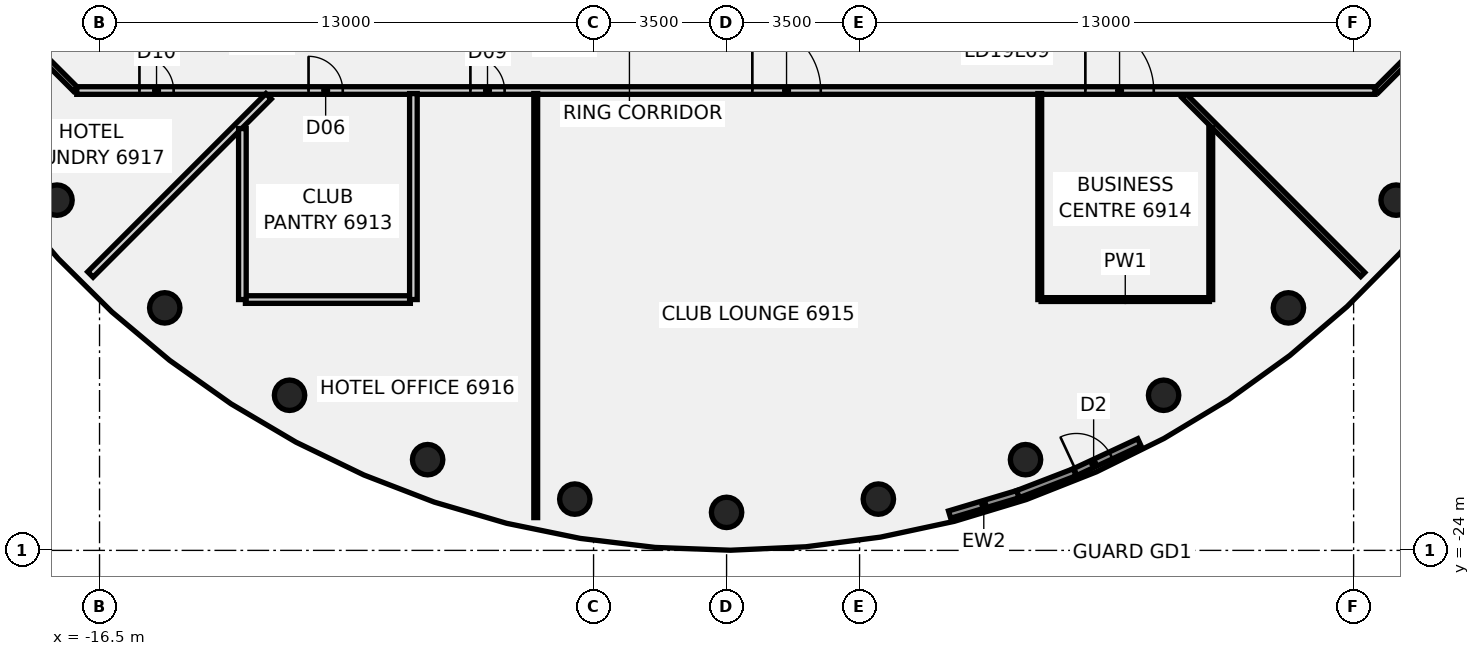
"""IFC4 building model, lengths in metres.
Left out: names, types, materials, properties, quantities, classifications, styles, units other than length and angle.
Written with IfcOpenShell. Run it as: python <this file> out.ifc"""

import sys

from ifc_helpers import new_model, si_unit, direction, frame, frame_2d, origin, origin_2d, place, context, subcontext, project, spatial, rectangle, circle, extrude, element, fill, save


model = new_model("IFC4")
c1 = context("Model", 3, precision=1e-05, world=origin(), true_north=direction((0.0, 1.0)))
c2 = subcontext(c1, "Body", "Model", "MODEL_VIEW")
j1 = project(units=[si_unit("LENGTHUNIT", "METRE"), si_unit("PLANEANGLEUNIT", "RADIAN")], contexts=[c1])
p1 = place(None, origin())
s1 = spatial("IfcSite", under=j1, at=p1, CompositionType="ELEMENT")
p2 = place(p1, origin())
s2 = spatial("IfcBuilding", under=s1, at=p2, CompositionType="ELEMENT")
p3 = place(p2, frame((0.0, 0.0, 271.2)))
s3 = spatial("IfcBuildingStorey", under=s2, at=p3, CompositionType="ELEMENT", Elevation=271.2)
for number, where, z_axis, x_axis in (
    (1, (-17.619, -14.784, -0.14), (0.0, 0.0, 1.0), (1.0, 0.0, 0.0)),
    (2, (-14.784, -17.619, -0.14), (0.0, 0.0, 1.0), (1.0, 0.0, 0.0)),
    (3, (-11.5, -19.919, -0.14), (0.0, 0.0, 1.0), (1.0, 0.0, 0.0)),
    (4, (-7.866, -21.613, -0.14), (0.0, 0.0, 1.0), (1.0, 0.0, 0.0)),
    (5, (-3.994, -22.651, -0.14), (0.0, 0.0, 1.0), (1.0, 0.0, 0.0)),
    (6, (0.0, -23.0, -0.14), (0.0, 0.0, 1.0), (1.0, 0.0, 0.0)),
    (7, (3.994, -22.651, -0.14), (0.0, 0.0, 1.0), (1.0, 0.0, 0.0)),
    (8, (7.866, -21.613, -0.14), (0.0, 0.0, 1.0), (1.0, 0.0, 0.0)),
    (9, (11.5, -19.919, -0.14), (0.0, 0.0, 1.0), (1.0, 0.0, 0.0)),
    (10, (14.784, -17.619, -0.14), (0.0, 0.0, 1.0), (1.0, 0.0, 0.0)),
    (11, (17.619, -14.784, -0.14), (0.0, 0.0, 1.0), (1.0, 0.0, 0.0)),
):
    element("IfcColumn", number, at=place(p3, frame(where, z_axis=z_axis, x_axis=x_axis)), inside=s3, PredefinedType="COLUMN", context=c2, shape_type="SweptSolid", body=[
        extrude(circle(Radius=0.4, at=origin_2d()), origin(), (0.0, 0.0, 1.0), 3.6),
    ])
p4 = place(p3, frame((-18.872, -10.128, 0.0), z_axis=(0.0, 0.0, 1.0), x_axis=(0.707106781187, -0.707106781187, 0.0)))
e12 = element("IfcWall", 12, at=p4, inside=s3, PredefinedType="PARTITIONING", context=c2, shape_type="SweptSolid", body=[
    extrude(rectangle(XDim=2.455, YDim=0.15, at=frame_2d((1.228, 0.0))), origin(), (0.0, 0.0, 1.0), 2.864),
])
p5 = place(p3, frame((12.034, -12.034, 0.0), z_axis=(0.0, 0.0, 1.0), x_axis=(0.707106781187, -0.707106781187, 0.0)))
e13 = element("IfcWall", 13, at=p5, inside=s3, PredefinedType="PARTITIONING", context=c2, shape_type="SweptSolid", body=[
    extrude(rectangle(XDim=6.655, YDim=0.15, at=frame_2d((3.328, 0.0))), origin(), (0.0, 0.0, 1.0), 2.864),
])
p6 = place(p3, frame((-17.1, -11.9, 0.0), z_axis=(0.0, 0.0, 1.0), x_axis=(1.0, 0.0, 0.0)))
e14 = element("IfcWall", 14, at=p6, inside=s3, PredefinedType="PARTITIONING", context=c2, shape_type="SweptSolid", body=[
    extrude(rectangle(XDim=34.165, YDim=0.2, at=frame_2d((17.083, 0.0))), origin(), (0.0, 0.0, 1.0), 2.864),
])
p7 = place(p6, frame((6.1, 0.0, 0.0)))
e15 = element("IfcOpeningElement", 15, at=p7, cuts=e14, PredefinedType="OPENING", context=c2, shape_type="SweptSolid", body=[
    extrude(rectangle(XDim=0.9, YDim=2.1, at=frame_2d((0.45, 1.05))), frame((0.0, 0.11, 0.0), z_axis=(0.0, -1.0, 0.0), x_axis=(1.0, 0.0, 0.0)), (0.0, 0.0, 1.0), 0.22),
])
p8 = place(p6, frame((26.541, 0.0, 0.0)))
e16 = element("IfcOpeningElement", 16, at=p8, cuts=e14, PredefinedType="OPENING", context=c2, shape_type="SweptSolid", body=[
    extrude(rectangle(XDim=1.8, YDim=2.1, at=frame_2d((0.9, 1.05))), frame((0.0, 0.11, 0.0), z_axis=(0.0, -1.0, 0.0), x_axis=(1.0, 0.0, 0.0)), (0.0, 0.0, 1.0), 0.22),
])
p9 = place(p6, frame((17.778, 0.0, 0.0)))
e17 = element("IfcOpeningElement", 17, at=p9, cuts=e14, PredefinedType="OPENING", context=c2, shape_type="SweptSolid", body=[
    extrude(rectangle(XDim=1.8, YDim=2.1, at=frame_2d((0.9, 1.05))), frame((0.0, 0.11, 0.0), z_axis=(0.0, -1.0, 0.0), x_axis=(1.0, 0.0, 0.0)), (0.0, 0.0, 1.0), 0.22),
])
p10 = place(p6, frame((10.359, 0.0, 0.0)))
e18 = element("IfcOpeningElement", 18, at=p10, cuts=e14, PredefinedType="OPENING", context=c2, shape_type="SweptSolid", body=[
    extrude(rectangle(XDim=0.9, YDim=2.1, at=frame_2d((0.45, 1.05))), frame((0.0, 0.11, 0.0), z_axis=(0.0, -1.0, 0.0), x_axis=(1.0, 0.0, 0.0)), (0.0, 0.0, 1.0), 0.22),
])
p11 = place(p6, frame((1.65, 0.0, 0.0)))
e19 = element("IfcOpeningElement", 19, at=p11, cuts=e14, PredefinedType="OPENING", context=c2, shape_type="SweptSolid", body=[
    extrude(rectangle(XDim=0.9, YDim=2.1, at=frame_2d((0.45, 1.05))), frame((0.0, 0.11, 0.0), z_axis=(0.0, -1.0, 0.0), x_axis=(1.0, 0.0, 0.0)), (0.0, 0.0, 1.0), 0.22),
])
p12 = place(p3, frame((-12.661, -17.4, 0.0), z_axis=(0.0, 0.0, 1.0), x_axis=(1.0, 0.0, 0.0)))
e20 = element("IfcWall", 20, at=p12, inside=s3, PredefinedType="PARTITIONING", context=c2, shape_type="SweptSolid", body=[
    extrude(rectangle(XDim=4.34, YDim=0.2, at=frame_2d((2.17, 0.0))), origin(), (0.0, 0.0, 1.0), 2.864),
])
p13 = place(p3, frame((8.276, -17.4, 0.0), z_axis=(0.0, 0.0, 1.0), x_axis=(1.0, 0.0, 0.0)))
e21 = element("IfcWall", 21, at=p13, inside=s3, PredefinedType="PARTITIONING", context=c2, shape_type="SweptSolid", body=[
    extrude(rectangle(XDim=4.43, YDim=0.1, at=frame_2d((2.215, 0.0))), origin(), (0.0, 0.0, 1.0), 2.864),
])
p14 = place(p3, frame((-16.74, -16.74, 0.0), z_axis=(0.0, 0.0, 1.0), x_axis=(0.707106781187, 0.707106781187, 0.0)))
e22 = element("IfcWall", 22, at=p14, inside=s3, PredefinedType="PARTITIONING", context=c2, shape_type="SweptSolid", body=[
    extrude(rectangle(XDim=6.631, YDim=0.2, at=frame_2d((3.315, 0.0))), origin(), (0.0, 0.0, 1.0), 2.864),
])
p15 = place(p3, frame((17.1, -11.9, 0.0), z_axis=(0.0, 0.0, 1.0), x_axis=(0.707106781187, 0.707106781187, 0.0)))
e23 = element("IfcWall", 23, at=p15, inside=s3, PredefinedType="PARTITIONING", context=c2, shape_type="SweptSolid", body=[
    extrude(rectangle(XDim=2.505, YDim=0.15, at=frame_2d((1.253, 0.0))), origin(), (0.0, 0.0, 1.0), 2.864),
])
p16 = place(p3, frame((-12.741, -17.4, 0.0), z_axis=(0.0, 0.0, 1.0), x_axis=(0.0, 1.0, 0.0)))
e24 = element("IfcWall", 24, at=p16, inside=s3, PredefinedType="PARTITIONING", context=c2, shape_type="SweptSolid", body=[
    extrude(rectangle(XDim=4.499, YDim=0.2, at=frame_2d((2.25, 0.0))), origin(), (0.0, 0.0, 1.0), 2.864),
])
p17 = place(p3, frame((-8.241, -17.4, 0.0), z_axis=(0.0, 0.0, 1.0), x_axis=(0.0, 1.0, 0.0)))
e25 = element("IfcWall", 25, at=p17, inside=s3, PredefinedType="PARTITIONING", context=c2, shape_type="SweptSolid", body=[
    extrude(rectangle(XDim=5.42, YDim=0.2, at=frame_2d((2.71, 0.0))), origin(), (0.0, 0.0, 1.0), 2.864),
])
p18 = place(p3, frame((-5.022, -23.137, 0.0), z_axis=(0.0, 0.0, 1.0), x_axis=(0.0, 1.0, 0.0)))
e26 = element("IfcWall", 26, at=p18, inside=s3, PredefinedType="PARTITIONING", context=c2, shape_type="SweptSolid", body=[
    extrude(rectangle(XDim=11.157, YDim=0.1, at=frame_2d((5.579, 0.0))), origin(), (0.0, 0.0, 1.0), 2.864),
])
p19 = place(p3, frame((8.241, -17.4, 0.0), z_axis=(0.0, 0.0, 1.0), x_axis=(0.0, 1.0, 0.0)))
e27 = element("IfcWall", 27, at=p19, inside=s3, PredefinedType="PARTITIONING", context=c2, shape_type="SweptSolid", body=[
    extrude(rectangle(XDim=5.42, YDim=0.1, at=frame_2d((2.71, 0.0))), origin(), (0.0, 0.0, 1.0), 2.864),
])
p20 = place(p3, frame((12.741, -17.4, 0.0), z_axis=(0.0, 0.0, 1.0), x_axis=(0.0, 1.0, 0.0)))
e28 = element("IfcWall", 28, at=p20, inside=s3, PredefinedType="PARTITIONING", context=c2, shape_type="SweptSolid", body=[
    extrude(rectangle(XDim=4.519, YDim=0.1, at=frame_2d((2.259, 0.0))), origin(), (0.0, 0.0, 1.0), 2.864),
])
p21 = place(p3, frame((5.869, -23.058, 0.0), z_axis=(0.0, 0.0, 1.0), x_axis=(0.958137061689, 0.28630992127, 0.0)))
e29 = element("IfcWall", 29, at=p21, inside=s3, PredefinedType="SOLIDWALL", context=c2, shape_type="SweptSolid", body=[
    extrude(rectangle(XDim=1.878, YDim=0.2, at=frame_2d((0.939, 0.0))), origin(), (0.0, 0.0, 1.0), 3.46),
])
p22 = place(p3, frame((9.16, -21.945, 0.0), z_axis=(0.0, 0.0, 1.0), x_axis=(0.906591500503, 0.422009302286, 0.0)))
e30 = element("IfcWall", 30, at=p22, inside=s3, PredefinedType="SOLIDWALL", context=c2, shape_type="SweptSolid", body=[
    extrude(rectangle(XDim=1.877, YDim=0.2, at=frame_2d((0.938, 0.0))), origin(), (0.0, 0.0, 1.0), 3.46),
])
p23 = place(p22, frame((0.05, 0.0, 0.0)))
e31 = element("IfcOpeningElement", 31, at=p23, cuts=e30, PredefinedType="OPENING", context=c2, shape_type="SweptSolid", body=[
    extrude(rectangle(XDim=1.0, YDim=2.4, at=frame_2d((0.5, 1.2))), frame((0.0, 0.11, 0.0), z_axis=(0.0, -1.0, 0.0), x_axis=(1.0, 0.0, 0.0)), (0.0, 0.0, 1.0), 0.22),
])
p24 = place(p3, frame((7.668, -22.52, 0.0), z_axis=(0.0, 0.0, 1.0), x_axis=(0.933046310402, 0.359756282287, 0.0)))
e32 = element("IfcWall", 32, at=p24, inside=s3, PredefinedType="SOLIDWALL", context=c2, shape_type="SweptSolid", body=[
    extrude(rectangle(XDim=1.6, YDim=0.2, at=frame_2d((0.8, 0.0))), origin(), (0.0, 0.0, 1.0), 3.46),
])
p25 = place(p7, frame((0.9, 0.0, 0.0), z_axis=(0.0, 0.0, 1.0), x_axis=(-1.0, 0.0, 0.0)))
e33 = element("IfcDoor", 33, at=p25, inside=s3, OperationType="SINGLE_SWING_LEFT", PredefinedType="DOOR", context=c2, shape_type="SweptSolid", body=[
    extrude(rectangle(XDim=0.9, YDim=2.1, at=frame_2d((0.45, 1.05))), frame((0.0, 0.025, 0.0), z_axis=(0.0, -1.0, 0.0), x_axis=(1.0, 0.0, 0.0)), (0.0, 0.0, 1.0), 0.05),
])
fill(e15, e33)
p26 = place(p8, frame((1.8, 0.0, 0.0), z_axis=(0.0, 0.0, 1.0), x_axis=(-1.0, 0.0, 0.0)))
e34 = element("IfcDoor", 34, at=p26, inside=s3, OperationType="DOUBLE_DOOR_SINGLE_SWING", PredefinedType="DOOR", context=c2, shape_type="SweptSolid", body=[
    extrude(rectangle(XDim=1.8, YDim=2.1, at=frame_2d((0.9, 1.05))), frame((0.0, 0.025, 0.0), z_axis=(0.0, -1.0, 0.0), x_axis=(1.0, 0.0, 0.0)), (0.0, 0.0, 1.0), 0.05),
])
fill(e16, e34)
p27 = place(p9, origin())
e35 = element("IfcDoor", 35, at=p27, inside=s3, OperationType="DOUBLE_DOOR_SINGLE_SWING", PredefinedType="DOOR", context=c2, shape_type="SweptSolid", body=[
    extrude(rectangle(XDim=1.8, YDim=2.1, at=frame_2d((0.9, 1.05))), frame((0.0, 0.025, 0.0), z_axis=(0.0, -1.0, 0.0), x_axis=(1.0, 0.0, 0.0)), (0.0, 0.0, 1.0), 0.05),
])
fill(e17, e35)
p28 = place(p10, frame((0.9, 0.0, 0.0), z_axis=(0.0, 0.0, 1.0), x_axis=(-1.0, 0.0, 0.0)))
e36 = element("IfcDoor", 36, at=p28, inside=s3, OperationType="SINGLE_SWING_LEFT", PredefinedType="DOOR", context=c2, shape_type="SweptSolid", body=[
    extrude(rectangle(XDim=0.9, YDim=2.1, at=frame_2d((0.45, 1.05))), frame((0.0, 0.025, 0.0), z_axis=(0.0, -1.0, 0.0), x_axis=(1.0, 0.0, 0.0)), (0.0, 0.0, 1.0), 0.05),
])
fill(e18, e36)
p29 = place(p11, frame((0.9, 0.0, 0.0), z_axis=(0.0, 0.0, 1.0), x_axis=(-1.0, 0.0, 0.0)))
e37 = element("IfcDoor", 37, at=p29, inside=s3, OperationType="SINGLE_SWING_LEFT", PredefinedType="DOOR", context=c2, shape_type="SweptSolid", body=[
    extrude(rectangle(XDim=0.9, YDim=2.1, at=frame_2d((0.45, 1.05))), frame((0.0, 0.025, 0.0), z_axis=(0.0, -1.0, 0.0), x_axis=(1.0, 0.0, 0.0)), (0.0, 0.0, 1.0), 0.05),
])
fill(e19, e37)
p30 = place(p23, origin())
e38 = element("IfcDoor", 38, at=p30, inside=s3, OperationType="SINGLE_SWING_LEFT", PredefinedType="DOOR", context=c2, shape_type="SweptSolid", body=[
    extrude(rectangle(XDim=1.0, YDim=2.4, at=frame_2d((0.5, 1.2))), frame((0.0, 0.025, 0.0), z_axis=(0.0, -1.0, 0.0), x_axis=(1.0, 0.0, 0.0)), (0.0, 0.0, 1.0), 0.05),
])
fill(e31, e38)
save(model, sys.argv[1])
